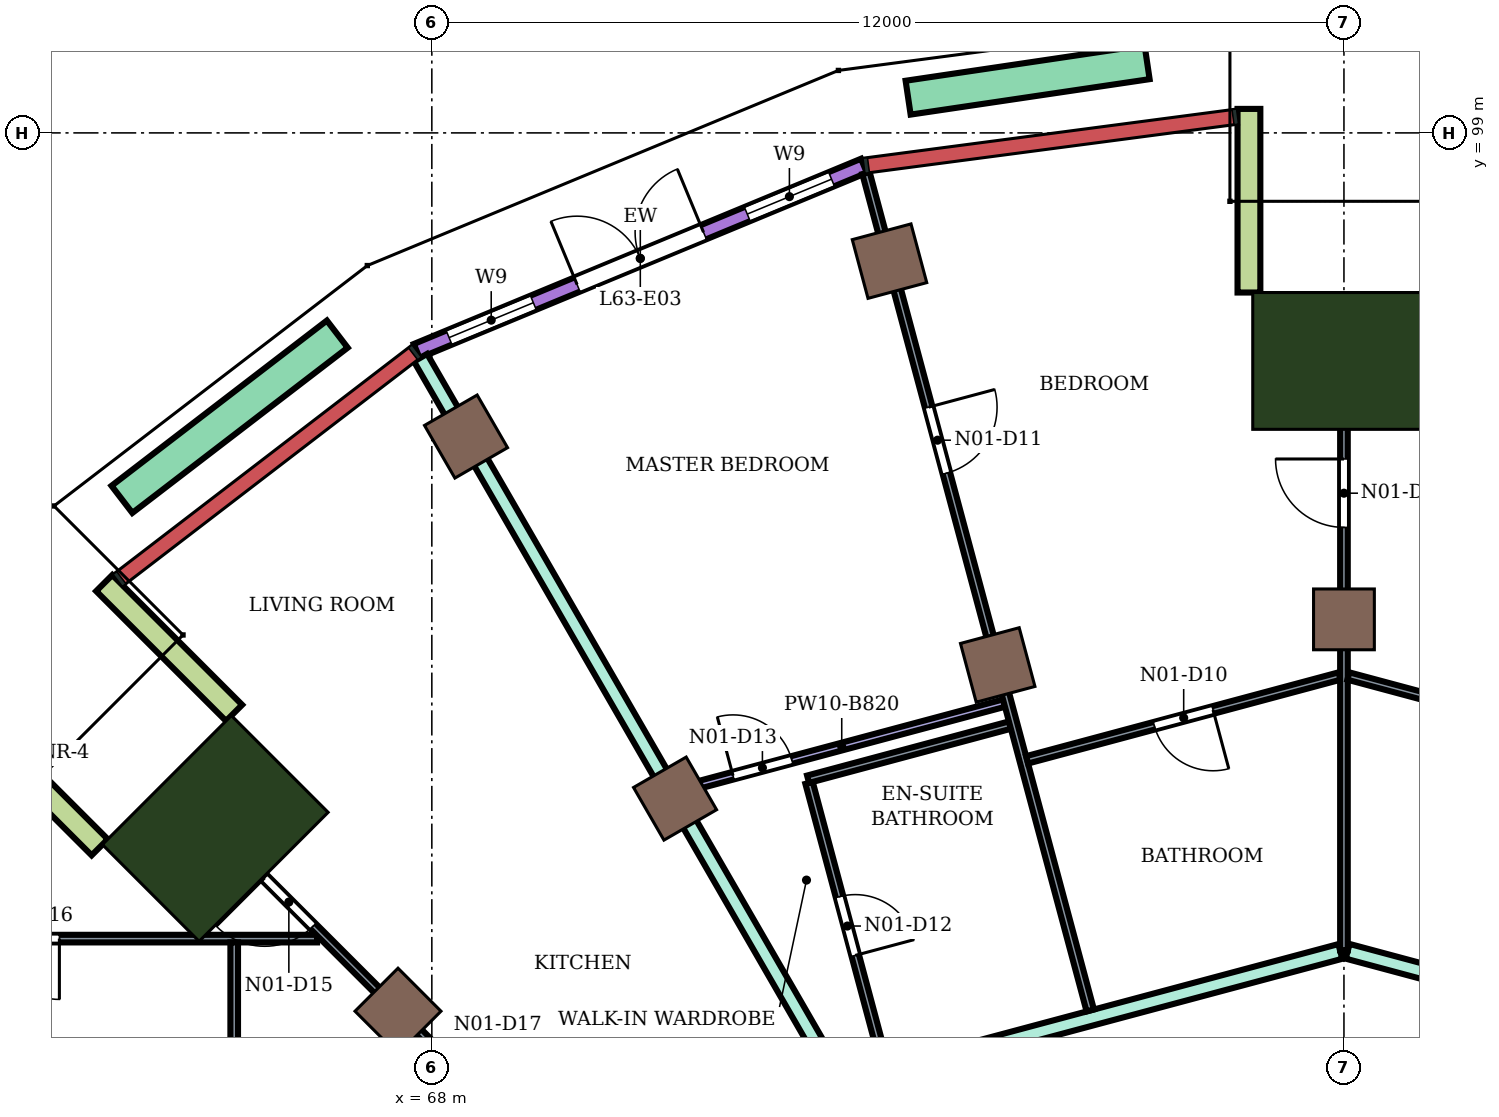
"""IFC4 building model, lengths in metres.
Left out: names, types, materials, properties, quantities, classifications, styles, units other than length and angle.
Written with IfcOpenShell. Run it as: python <this file> out.ifc"""

import sys

from ifc_helpers import new_model, si_unit, direction, frame, frame_2d, origin, origin_2d, place, context, subcontext, project, spatial, rectangle, extrude, element, fill, save


model = new_model("IFC4")
c1 = context("Model", 3, precision=1e-05, world=origin(), true_north=direction((0.0, 1.0)))
c2 = subcontext(c1, "Body", "Model", "MODEL_VIEW")
j1 = project(units=[si_unit("LENGTHUNIT", "METRE"), si_unit("PLANEANGLEUNIT", "RADIAN")], contexts=[c1])
p1 = place(None, origin())
s1 = spatial("IfcSite", under=j1, at=p1, CompositionType="ELEMENT")
p2 = place(p1, origin())
s2 = spatial("IfcBuilding", under=s1, at=p2, CompositionType="ELEMENT")
p3 = place(p2, frame((0.0, 0.0, 275.7)))
s3 = spatial("IfcBuildingStorey", under=s2, at=p3, CompositionType="ELEMENT", Elevation=275.7)
for number, where, z_axis, x_axis in (
    (1, (74.021, 97.313, 0.0), (0.0, 0.0, 1.0), (-0.259, 0.966, 0.0)),
    (2, (68.45, 95.005, 0.0), (0.0, 0.0, 1.0), (-0.5, 0.866, 0.0)),
    (3, (80.0, 92.6, 0.0), (0.0, 0.0, 1.0), (0.0, 1.0, 0.0)),
    (4, (75.445, 92.0, 0.0), (0.0, 0.0, 1.0), (-0.259, 0.966, 0.0)),
    (5, (71.2, 90.242, 0.0), (0.0, 0.0, 1.0), (-0.5, 0.866, 0.0)),
    (6, (67.555, 87.445, 0.0), (0.0, 0.0, 1.0), (-0.707, 0.707, 0.0)),
):
    element("IfcColumn", number, at=place(p3, frame(where, z_axis=z_axis, x_axis=x_axis)), inside=s3, PredefinedType="COLUMN", context=c2, shape_type="SweptSolid", body=[
        extrude(rectangle(XDim=0.8, YDim=0.8, at=origin_2d()), origin(), (0.0, 0.0, 1.0), 4.2),
    ])
for number, where, z_axis, x_axis in (
    (7, (80.0, 96.0, 0.0), (0.0, 0.0, 1.0), (0.0, 1.0, 0.0)),
    (8, (65.151, 89.849, 0.0), (0.0, 0.0, 1.0), (-0.707, 0.707, 0.0)),
):
    element("IfcColumn", number, at=place(p3, frame(where, z_axis=z_axis, x_axis=x_axis)), inside=s3, PredefinedType="COLUMN", context=c2, shape_type="SweptSolid", body=[
        extrude(rectangle(XDim=1.8, YDim=2.4, at=origin_2d()), origin(), (0.0, 0.0, 1.0), 4.2),
    ])
p4 = place(p3, frame((73.685, 98.568, 0.0), z_axis=(0.0, 0.0, 1.0), x_axis=(-0.923876679743, -0.382690319485, 0.0)))
e9 = element("IfcWall", 9, at=p4, inside=s3, PredefinedType="NOTDEFINED", context=c2, shape_type="SweptSolid", body=[
    extrude(rectangle(XDim=6.369, YDim=0.2, at=frame_2d((3.185, 0.0))), origin(), (0.0, 0.0, 1.0), 4.2),
])
p5 = place(p4, frame((0.462, 0.0, 0.9)))
e10 = element("IfcOpeningElement", 10, at=p5, cuts=e9, PredefinedType="OPENING", context=c2, shape_type="SweptSolid", body=[
    extrude(rectangle(XDim=1.2, YDim=2.7, at=frame_2d((0.6, 1.35))), frame((0.0, 0.11, 0.0), z_axis=(0.0, -1.0, 0.0), x_axis=(1.0, 0.0, 0.0)), (0.0, 0.0, 1.0), 0.22),
])
p6 = place(p4, frame((2.285, 0.0, 0.0)))
e11 = element("IfcOpeningElement", 11, at=p6, cuts=e9, PredefinedType="OPENING", context=c2, shape_type="SweptSolid", body=[
    extrude(rectangle(XDim=1.8, YDim=2.7, at=frame_2d((0.9, 1.35))), frame((0.0, 0.11, 0.0), z_axis=(0.0, -1.0, 0.0), x_axis=(1.0, 0.0, 0.0)), (0.0, 0.0, 1.0), 0.22),
])
p7 = place(p4, frame((4.708, 0.0, 0.9)))
e12 = element("IfcOpeningElement", 12, at=p7, cuts=e9, PredefinedType="OPENING", context=c2, shape_type="SweptSolid", body=[
    extrude(rectangle(XDim=1.2, YDim=2.7, at=frame_2d((0.6, 1.35))), frame((0.0, 0.11, 0.0), z_axis=(0.0, -1.0, 0.0), x_axis=(1.0, 0.0, 0.0)), (0.0, 0.0, 1.0), 0.22),
])
p8 = place(p3, frame((78.75, 96.9, 0.0), z_axis=(0.0, 0.0, 1.0), x_axis=(0.0, 1.0, 0.0)))
e13 = element("IfcWall", 13, at=p8, inside=s3, PredefinedType="NOTDEFINED", context=c2, shape_type="SweptSolid", body=[
    extrude(rectangle(XDim=2.416, YDim=0.3, at=frame_2d((1.208, 0.0))), origin(), (0.0, 0.0, 1.0), 4.2),
])
for number, where, z_axis, x_axis in (
    (14, (65.398, 91.37, 0.0), (0.0, 0.0, 1.0), (-0.707, 0.707, 0.0)),
    (15, (63.63, 89.602, 0.0), (0.0, 0.0, 1.0), (-0.707, 0.707, 0.0)),
):
    element("IfcWall", number, at=place(p3, frame(where, z_axis=z_axis, x_axis=x_axis)), inside=s3, PredefinedType="NOTDEFINED", context=c2, shape_type="SweptSolid", body=[
        extrude(rectangle(XDim=2.416, YDim=0.3, at=frame_2d((1.208, 0.0))), origin(), (0.0, 0.0, 1.0), 4.2),
    ])
p9 = place(p3, frame((77.41, 99.93, 0.0), z_axis=(0.0, 0.0, 1.0), x_axis=(-0.989179529329, -0.14671011811, 0.0)))
e16 = element("IfcWall", 16, at=p9, inside=s3, PredefinedType="USERDEFINED", context=c2, shape_type="SweptSolid", body=[
    extrude(rectangle(XDim=3.178, YDim=0.45, at=frame_2d((1.589, 0.0))), origin(), (0.0, 0.0, 1.0), 0.6),
])
p10 = place(p3, frame((66.756, 96.353, 0.0), z_axis=(0.0, 0.0, 1.0), x_axis=(-0.793347717383, -0.608768756855, 0.0)))
e17 = element("IfcWall", 17, at=p10, inside=s3, PredefinedType="USERDEFINED", context=c2, shape_type="SweptSolid", body=[
    extrude(rectangle(XDim=3.571, YDim=0.45, at=frame_2d((1.786, 0.0))), origin(), (0.0, 0.0, 1.0), 0.6),
])
p11 = place(p3, frame((67.852, 96.042, 0.0), z_axis=(0.0, 0.0, 1.0), x_axis=(0.499960582802, -0.866048160118, 0.0)))
e18 = element("IfcWall", 18, at=p11, inside=s3, PredefinedType="PARTITIONING", context=c2, shape_type="SweptSolid", body=[
    extrude(rectangle(XDim=10.946, YDim=0.2, at=frame_2d((5.473, 0.0))), origin(), (0.0, 0.0, 1.0), 3.75),
])
p12 = place(p3, frame((73.687, 86.554, 0.0), z_axis=(0.0, 0.0, 1.0), x_axis=(0.966002126521, 0.258534120682, 0.0)))
e19 = element("IfcWall", 19, at=p12, inside=s3, PredefinedType="PARTITIONING", context=c2, shape_type="SweptSolid", body=[
    extrude(rectangle(XDim=6.486, YDim=0.2, at=frame_2d((3.243, 0.0))), origin(), (0.0, 0.0, 1.0), 3.75),
])
p13 = place(p3, frame((80.048, 88.233, 0.0), z_axis=(0.0, 0.0, 1.0), x_axis=(0.965865387308, -0.259044501198, 0.0)))
e20 = element("IfcWall", 20, at=p13, inside=s3, PredefinedType="PARTITIONING", context=c2, shape_type="SweptSolid", body=[
    extrude(rectangle(XDim=6.476, YDim=0.2, at=frame_2d((3.238, 0.0))), origin(), (0.0, 0.0, 1.0), 3.75),
])
p14 = place(p13, frame((4.936, 0.0, 0.0)))
e21 = element("IfcOpeningElement", 21, at=p14, cuts=e20, PredefinedType="OPENING", context=c2, shape_type="SweptSolid", body=[
    extrude(rectangle(XDim=1.0, YDim=2.1, at=frame_2d((0.5, 1.05))), frame((0.0, 0.11, 0.0), z_axis=(0.0, -1.0, 0.0), x_axis=(1.0, 0.0, 0.0)), (0.0, 0.0, 1.0), 0.22),
])
p15 = place(p3, frame((59.87, 88.4, 0.0), z_axis=(0.0, 0.0, 1.0), x_axis=(1.0, 0.0, 0.0)))
e22 = element("IfcWall", 22, at=p15, inside=s3, PredefinedType="PARTITIONING", context=c2, shape_type="SweptSolid", body=[
    extrude(rectangle(XDim=6.62, YDim=0.1, at=frame_2d((3.31, 0.0))), origin(), (0.0, 0.0, 1.0), 3.75),
])
p16 = place(p15, frame((2.43, 0.0, 0.0)))
e23 = element("IfcOpeningElement", 23, at=p16, cuts=e22, PredefinedType="OPENING", context=c2, shape_type="SweptSolid", body=[
    extrude(rectangle(XDim=0.8, YDim=2.1, at=frame_2d((0.4, 1.05))), frame((0.0, 0.06, 0.0), z_axis=(0.0, -1.0, 0.0), x_axis=(1.0, 0.0, 0.0)), (0.0, 0.0, 1.0), 0.12),
])
p17 = place(p3, frame((64.656, 90.344, 0.0), z_axis=(0.0, 0.0, 1.0), x_axis=(0.707106781187, -0.707106781187, 0.0)))
e24 = element("IfcWall", 24, at=p17, inside=s3, PredefinedType="PARTITIONING", context=c2, shape_type="SweptSolid", body=[
    extrude(rectangle(XDim=7.0, YDim=0.1, at=frame_2d((3.5, 0.0))), origin(), (0.0, 0.0, 1.0), 3.75),
])
p18 = place(p17, frame((1.619, 0.0, 0.0)))
e25 = element("IfcOpeningElement", 25, at=p18, cuts=e24, PredefinedType="OPENING", context=c2, shape_type="SweptSolid", body=[
    extrude(rectangle(XDim=0.9, YDim=2.1, at=frame_2d((0.45, 1.05))), frame((0.0, 0.06, 0.0), z_axis=(0.0, -1.0, 0.0), x_axis=(1.0, 0.0, 0.0)), (0.0, 0.0, 1.0), 0.12),
])
p19 = place(p17, frame((4.755, 0.0, 0.0)))
e26 = element("IfcOpeningElement", 26, at=p19, cuts=e24, PredefinedType="OPENING", context=c2, shape_type="SweptSolid", body=[
    extrude(rectangle(XDim=0.8, YDim=2.1, at=frame_2d((0.4, 1.05))), frame((0.0, 0.06, 0.0), z_axis=(0.0, -1.0, 0.0), x_axis=(1.0, 0.0, 0.0)), (0.0, 0.0, 1.0), 0.12),
])
p20 = place(p3, frame((65.4, 85.0, 0.0), z_axis=(0.0, 0.0, 1.0), x_axis=(0.0, 1.0, 0.0)))
e27 = element("IfcWall", 27, at=p20, inside=s3, PredefinedType="PARTITIONING", context=c2, shape_type="SweptSolid", body=[
    extrude(rectangle(XDim=3.35, YDim=0.1, at=frame_2d((1.675, 0.0))), origin(), (0.0, 0.0, 1.0), 3.75),
])
p21 = place(p3, frame((71.258, 90.354, 0.0), z_axis=(0.0, 0.0, 1.0), x_axis=(0.965955692548, 0.258707556973, 0.0)))
e28 = element("IfcWall", 28, at=p21, inside=s3, PredefinedType="PARTITIONING", context=c2, shape_type="SweptSolid", body=[
    extrude(rectangle(XDim=4.42, YDim=0.1, at=frame_2d((2.21, 0.0))), origin(), (0.0, 0.0, 1.0), 3.38),
])
p22 = place(p21, frame((0.73, 0.0, 0.0)))
e29 = element("IfcOpeningElement", 29, at=p22, cuts=e28, PredefinedType="OPENING", context=c2, shape_type="SweptSolid", body=[
    extrude(rectangle(XDim=0.8, YDim=2.1, at=frame_2d((0.4, 1.05))), frame((0.0, 0.06, 0.0), z_axis=(0.0, -1.0, 0.0), x_axis=(1.0, 0.0, 0.0)), (0.0, 0.0, 1.0), 0.12),
])
p23 = place(p3, frame((72.963, 90.449, 0.0), z_axis=(0.0, 0.0, 1.0), x_axis=(0.25854689918, -0.965998706482, 0.0)))
e30 = element("IfcWall", 30, at=p23, inside=s3, PredefinedType="PARTITIONING", context=c2, shape_type="SweptSolid", body=[
    extrude(rectangle(XDim=3.849, YDim=0.1, at=frame_2d((1.924, 0.0))), origin(), (0.0, 0.0, 1.0), 3.75),
])
p24 = place(p23, frame((1.55, 0.0, 0.0)))
e31 = element("IfcOpeningElement", 31, at=p24, cuts=e30, PredefinedType="OPENING", context=c2, shape_type="SweptSolid", body=[
    extrude(rectangle(XDim=0.8, YDim=2.1, at=frame_2d((0.4, 1.05))), frame((0.0, 0.06, 0.0), z_axis=(0.0, -1.0, 0.0), x_axis=(1.0, 0.0, 0.0)), (0.0, 0.0, 1.0), 0.12),
])
p25 = place(p3, frame((72.95, 90.497, 0.0), z_axis=(0.0, 0.0, 1.0), x_axis=(0.96588619323, 0.258966912418, 0.0)))
e32 = element("IfcWall", 32, at=p25, inside=s3, PredefinedType="PARTITIONING", context=c2, shape_type="SweptSolid", body=[
    extrude(rectangle(XDim=2.749, YDim=0.1, at=frame_2d((1.375, 0.0))), origin(), (0.0, 0.0, 1.0), 3.75),
])
p26 = place(p3, frame((73.712, 98.47, 0.0), z_axis=(0.0, 0.0, 1.0), x_axis=(0.258727167471, -0.965950440143, 0.0)))
e33 = element("IfcWall", 33, at=p26, inside=s3, PredefinedType="PARTITIONING", context=c2, shape_type="SweptSolid", body=[
    extrude(rectangle(XDim=11.404, YDim=0.1, at=frame_2d((5.702, 0.0))), origin(), (0.0, 0.0, 1.0), 3.75),
])
p27 = place(p26, frame((3.187, 0.0, 0.0)))
e34 = element("IfcOpeningElement", 34, at=p27, cuts=e33, PredefinedType="OPENING", context=c2, shape_type="SweptSolid", body=[
    extrude(rectangle(XDim=0.9, YDim=2.1, at=frame_2d((0.45, 1.05))), frame((0.0, 0.06, 0.0), z_axis=(0.0, -1.0, 0.0), x_axis=(1.0, 0.0, 0.0)), (0.0, 0.0, 1.0), 0.12),
])
p28 = place(p3, frame((75.832, 90.752, 0.0), z_axis=(0.0, 0.0, 1.0), x_axis=(0.965856843682, 0.259076354601, 0.0)))
e35 = element("IfcWall", 35, at=p28, inside=s3, PredefinedType="PARTITIONING", context=c2, shape_type="SweptSolid", body=[
    extrude(rectangle(XDim=4.256, YDim=0.1, at=frame_2d((2.128, 0.0))), origin(), (0.0, 0.0, 1.0), 3.75),
])
p29 = place(p28, frame((1.733, 0.0, 0.0)))
e36 = element("IfcOpeningElement", 36, at=p29, cuts=e35, PredefinedType="OPENING", context=c2, shape_type="SweptSolid", body=[
    extrude(rectangle(XDim=0.8, YDim=2.1, at=frame_2d((0.4, 1.05))), frame((0.0, 0.06, 0.0), z_axis=(0.0, -1.0, 0.0), x_axis=(1.0, 0.0, 0.0)), (0.0, 0.0, 1.0), 0.12),
])
p30 = place(p3, frame((80.0, 88.246, 0.0), z_axis=(0.0, 0.0, 1.0), x_axis=(0.0, 1.0, 0.0)))
e37 = element("IfcWall", 37, at=p30, inside=s3, PredefinedType="PARTITIONING", context=c2, shape_type="SweptSolid", body=[
    extrude(rectangle(XDim=8.454, YDim=0.1, at=frame_2d((4.227, 0.0))), origin(), (0.0, 0.0, 1.0), 3.75),
])
p31 = place(p30, frame((5.564, 0.0, 0.0)))
e38 = element("IfcOpeningElement", 38, at=p31, cuts=e37, PredefinedType="OPENING", context=c2, shape_type="SweptSolid", body=[
    extrude(rectangle(XDim=0.9, YDim=2.1, at=frame_2d((0.45, 1.05))), frame((0.0, 0.06, 0.0), z_axis=(0.0, -1.0, 0.0), x_axis=(1.0, 0.0, 0.0)), (0.0, 0.0, 1.0), 0.12),
])
p32 = place(p3, frame((80.058, 91.854, 0.0), z_axis=(0.0, 0.0, 1.0), x_axis=(0.96586069397, -0.259061999998, 0.0)))
e39 = element("IfcWall", 39, at=p32, inside=s3, PredefinedType="PARTITIONING", context=c2, shape_type="SweptSolid", body=[
    extrude(rectangle(XDim=4.256, YDim=0.1, at=frame_2d((2.128, 0.0))), origin(), (0.0, 0.0, 1.0), 3.75),
])
p33 = place(p5, origin())
e40 = element("IfcWindow", 40, at=p33, inside=s3, PartitioningType="SINGLE_PANEL", PredefinedType="WINDOW", context=c2, shape_type="SweptSolid", body=[
    extrude(rectangle(XDim=1.2, YDim=2.7, at=frame_2d((0.6, 1.35))), frame((0.0, 0.03, 0.0), z_axis=(0.0, -1.0, 0.0), x_axis=(1.0, 0.0, 0.0)), (0.0, 0.0, 1.0), 0.06),
])
fill(e10, e40)
p34 = place(p6, frame((1.8, 0.0, 0.0), z_axis=(0.0, 0.0, 1.0), x_axis=(-1.0, 0.0, 0.0)))
e41 = element("IfcDoor", 41, at=p34, inside=s3, OperationType="DOUBLE_DOOR_SINGLE_SWING", PredefinedType="DOOR", context=c2, shape_type="SweptSolid", body=[
    extrude(rectangle(XDim=1.8, YDim=2.7, at=frame_2d((0.9, 1.35))), frame((0.0, 0.025, 0.0), z_axis=(0.0, -1.0, 0.0), x_axis=(1.0, 0.0, 0.0)), (0.0, 0.0, 1.0), 0.05),
])
fill(e11, e41)
p35 = place(p7, origin())
e42 = element("IfcWindow", 42, at=p35, inside=s3, PartitioningType="SINGLE_PANEL", PredefinedType="WINDOW", context=c2, shape_type="SweptSolid", body=[
    extrude(rectangle(XDim=1.2, YDim=2.7, at=frame_2d((0.6, 1.35))), frame((0.0, 0.03, 0.0), z_axis=(0.0, -1.0, 0.0), x_axis=(1.0, 0.0, 0.0)), (0.0, 0.0, 1.0), 0.06),
])
fill(e12, e42)
p36 = place(p31, origin())
e43 = element("IfcDoor", 43, at=p36, inside=s3, OperationType="SINGLE_SWING_RIGHT", PredefinedType="DOOR", context=c2, shape_type="SweptSolid", body=[
    extrude(rectangle(XDim=0.9, YDim=2.1, at=frame_2d((0.45, 1.05))), frame((0.0, 0.025, 0.0), z_axis=(0.0, -1.0, 0.0), x_axis=(1.0, 0.0, 0.0)), (0.0, 0.0, 1.0), 0.05),
])
fill(e38, e43)
p37 = place(p29, frame((0.8, 0.0, 0.0), z_axis=(0.0, 0.0, 1.0), x_axis=(-1.0, 0.0, 0.0)))
e44 = element("IfcDoor", 44, at=p37, inside=s3, OperationType="SINGLE_SWING_LEFT", PredefinedType="DOOR", context=c2, shape_type="SweptSolid", body=[
    extrude(rectangle(XDim=0.8, YDim=2.1, at=frame_2d((0.4, 1.05))), frame((0.0, 0.025, 0.0), z_axis=(0.0, -1.0, 0.0), x_axis=(1.0, 0.0, 0.0)), (0.0, 0.0, 1.0), 0.05),
])
fill(e36, e44)
p38 = place(p27, origin())
e45 = element("IfcDoor", 45, at=p38, inside=s3, OperationType="SINGLE_SWING_LEFT", PredefinedType="DOOR", context=c2, shape_type="SweptSolid", body=[
    extrude(rectangle(XDim=0.9, YDim=2.1, at=frame_2d((0.45, 1.05))), frame((0.0, 0.025, 0.0), z_axis=(0.0, -1.0, 0.0), x_axis=(1.0, 0.0, 0.0)), (0.0, 0.0, 1.0), 0.05),
])
fill(e34, e45)
p39 = place(p24, origin())
e46 = element("IfcDoor", 46, at=p39, inside=s3, OperationType="SINGLE_SWING_RIGHT", PredefinedType="DOOR", context=c2, shape_type="SweptSolid", body=[
    extrude(rectangle(XDim=0.8, YDim=2.1, at=frame_2d((0.4, 1.05))), frame((0.0, 0.025, 0.0), z_axis=(0.0, -1.0, 0.0), x_axis=(1.0, 0.0, 0.0)), (0.0, 0.0, 1.0), 0.05),
])
fill(e31, e46)
p40 = place(p22, origin())
e47 = element("IfcDoor", 47, at=p40, inside=s3, OperationType="SINGLE_SWING_LEFT", PredefinedType="DOOR", context=c2, shape_type="SweptSolid", body=[
    extrude(rectangle(XDim=0.8, YDim=2.1, at=frame_2d((0.4, 1.05))), frame((0.0, 0.025, 0.0), z_axis=(0.0, -1.0, 0.0), x_axis=(1.0, 0.0, 0.0)), (0.0, 0.0, 1.0), 0.05),
])
fill(e29, e47)
p41 = place(p18, frame((0.9, 0.0, 0.0), z_axis=(0.0, 0.0, 1.0), x_axis=(-1.0, 0.0, 0.0)))
e48 = element("IfcDoor", 48, at=p41, inside=s3, OperationType="SINGLE_SWING_RIGHT", PredefinedType="DOOR", context=c2, shape_type="SweptSolid", body=[
    extrude(rectangle(XDim=0.9, YDim=2.1, at=frame_2d((0.45, 1.05))), frame((0.0, 0.025, 0.0), z_axis=(0.0, -1.0, 0.0), x_axis=(1.0, 0.0, 0.0)), (0.0, 0.0, 1.0), 0.05),
])
fill(e25, e48)
p42 = place(p16, frame((0.8, 0.0, 0.0), z_axis=(0.0, 0.0, 1.0), x_axis=(-1.0, 0.0, 0.0)))
e49 = element("IfcDoor", 49, at=p42, inside=s3, OperationType="SINGLE_SWING_LEFT", PredefinedType="DOOR", context=c2, shape_type="SweptSolid", body=[
    extrude(rectangle(XDim=0.8, YDim=2.1, at=frame_2d((0.4, 1.05))), frame((0.0, 0.025, 0.0), z_axis=(0.0, -1.0, 0.0), x_axis=(1.0, 0.0, 0.0)), (0.0, 0.0, 1.0), 0.05),
])
fill(e23, e49)
save(model, sys.argv[1])
